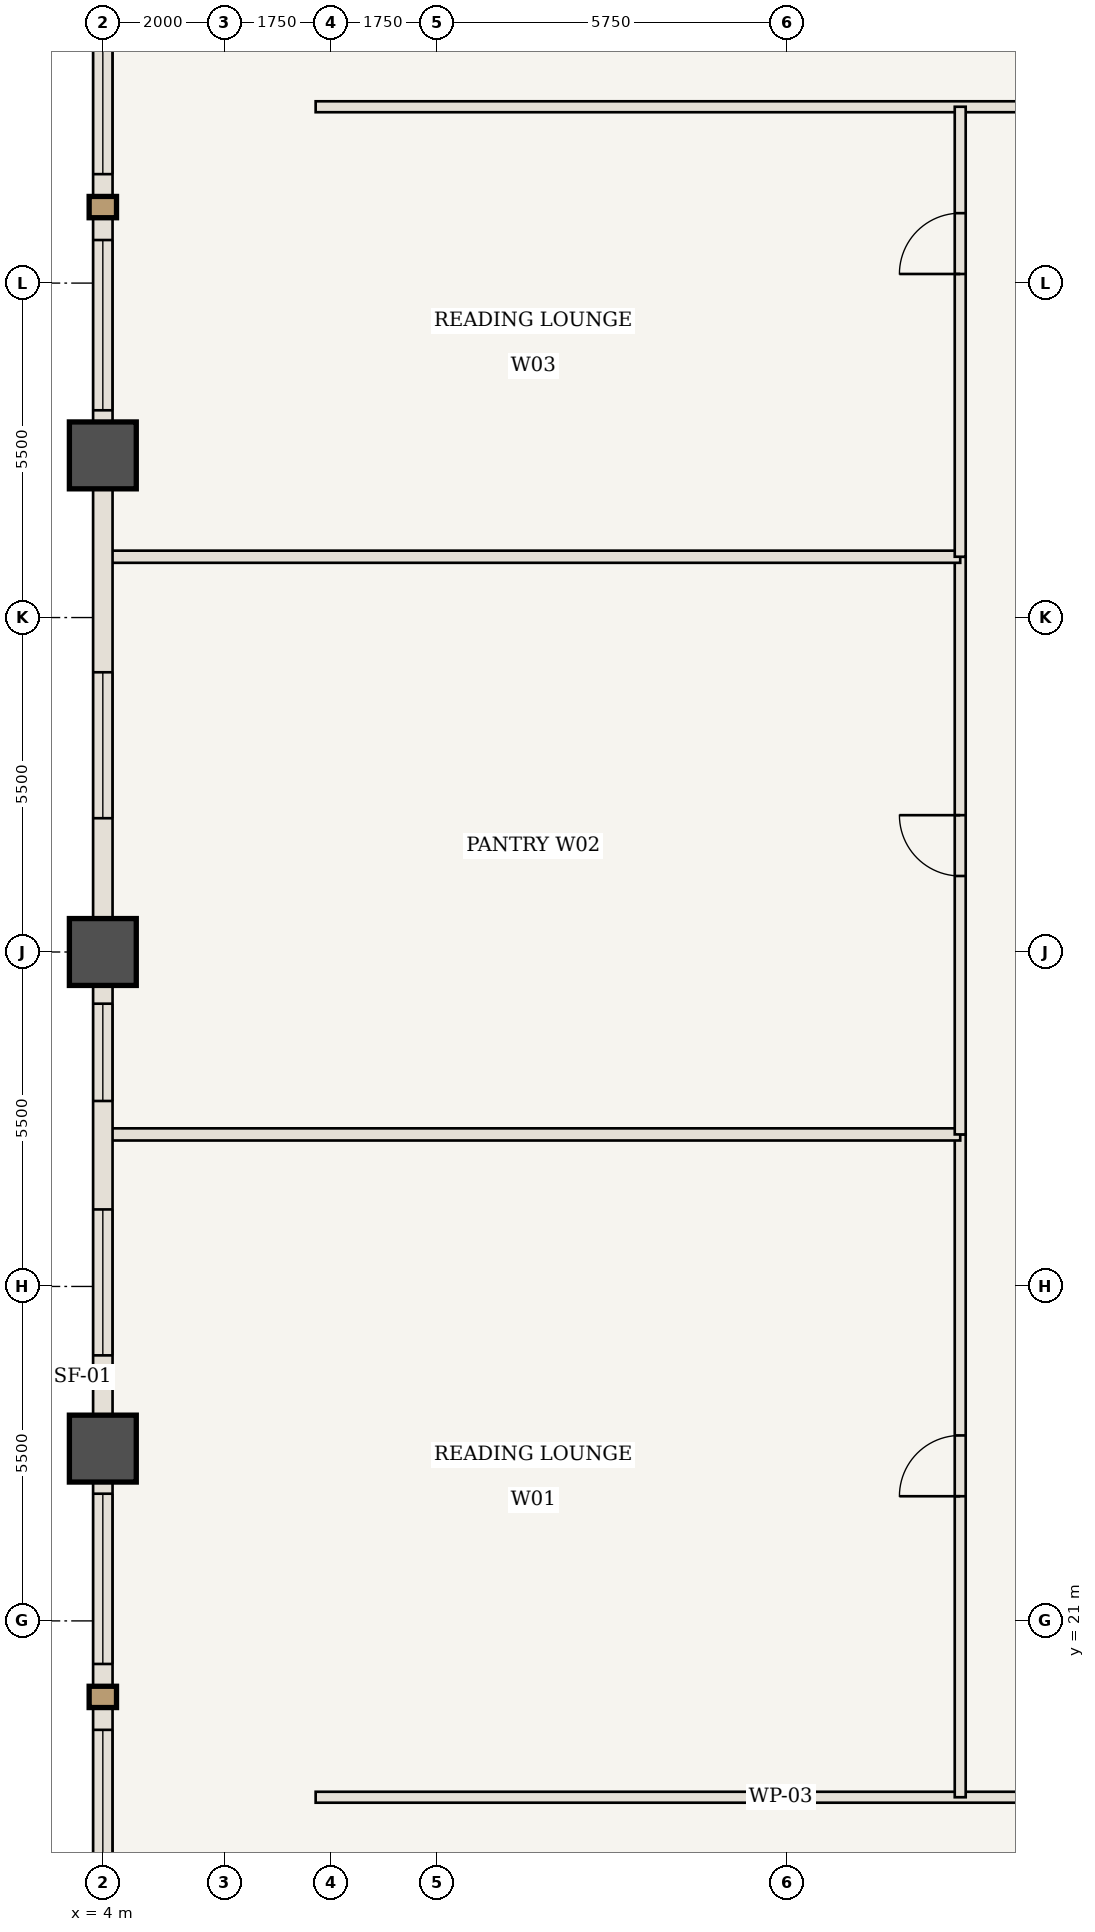
"""IFC4 building model, lengths in metres.
Left out: names, types, materials, properties, quantities, classifications, styles, units other than length and angle.
Written with IfcOpenShell. Run it as: python <this file> out.ifc"""

import sys

from ifc_helpers import new_model, si_unit, direction, frame, frame_2d, origin, origin_2d, place, context, subcontext, project, spatial, rectangle, extrude, element, fill, save


model = new_model("IFC4")
c1 = context("Model", 3, precision=1e-05, world=origin(), true_north=direction((0.0, 1.0)))
c2 = subcontext(c1, "Body", "Model", "MODEL_VIEW")
j1 = project(units=[si_unit("LENGTHUNIT", "METRE"), si_unit("PLANEANGLEUNIT", "RADIAN")], contexts=[c1])
p1 = place(None, origin())
s1 = spatial("IfcSite", under=j1, at=p1, CompositionType="ELEMENT")
p2 = place(p1, origin())
s2 = spatial("IfcBuilding", under=s1, at=p2, CompositionType="ELEMENT")
p3 = place(p2, frame((0.0, 0.0, 56.35)))
s3 = spatial("IfcBuildingStorey", under=s2, at=p3, CompositionType="ELEMENT", Elevation=56.35)
for number, where, z_axis, x_axis in (
    (1, (4.0, 23.833, 0.0), (0.0, 0.0, 1.0), (1.0, 0.0, 0.0)),
    (2, (4.0, 32.0, 0.0), (0.0, 0.0, 1.0), (1.0, 0.0, 0.0)),
    (3, (4.0, 40.167, 0.0), (0.0, 0.0, 1.0), (1.0, 0.0, 0.0)),
):
    element("IfcColumn", number, at=place(p3, frame(where, z_axis=z_axis, x_axis=x_axis)), inside=s3, PredefinedType="COLUMN", context=c2, shape_type="SweptSolid", body=[
        extrude(rectangle(XDim=1.1, YDim=1.1, at=origin_2d()), origin(), (0.0, 0.0, 1.0), 3.5),
    ])
p4 = place(p3, frame((7.5, 18.1, 0.0), z_axis=(0.0, 0.0, 1.0), x_axis=(1.0, 0.0, 0.0)))
e4 = element("IfcWall", 4, at=p4, inside=s3, PredefinedType="STANDARD", context=c2, shape_type="SweptSolid", body=[
    extrude(rectangle(XDim=15.3, YDim=0.18, at=frame_2d((7.65, 0.0))), origin(), (0.0, 0.0, 1.0), 3.32),
])
p5 = place(p4, frame((12.475, 0.0, 0.0)))
e5 = element("IfcOpeningElement", 5, at=p5, cuts=e4, PredefinedType="OPENING", context=c2, shape_type="SweptSolid", body=[
    extrude(rectangle(XDim=1.0, YDim=2.15, at=frame_2d((0.5, 1.075))), frame((0.0, 0.1, 0.0), z_axis=(0.0, -1.0, 0.0), x_axis=(1.0, 0.0, 0.0)), (0.0, 0.0, 1.0), 0.2),
])
p6 = place(p3, frame((7.5, 45.9, 0.0), z_axis=(0.0, 0.0, 1.0), x_axis=(1.0, 0.0, 0.0)))
e6 = element("IfcWall", 6, at=p6, inside=s3, PredefinedType="STANDARD", context=c2, shape_type="SweptSolid", body=[
    extrude(rectangle(XDim=16.4, YDim=0.18, at=frame_2d((8.2, 0.0))), origin(), (0.0, 0.0, 1.0), 3.32),
])
p7 = place(p6, frame((11.575, 0.0, 0.0)))
e7 = element("IfcOpeningElement", 7, at=p7, cuts=e6, PredefinedType="OPENING", context=c2, shape_type="SweptSolid", body=[
    extrude(rectangle(XDim=1.0, YDim=2.15, at=frame_2d((0.5, 1.075))), frame((0.0, 0.1, 0.0), z_axis=(0.0, -1.0, 0.0), x_axis=(1.0, 0.0, 0.0)), (0.0, 0.0, 1.0), 0.2),
])
p8 = place(p3, frame((18.1, 18.1, 0.0), z_axis=(0.0, 0.0, 1.0), x_axis=(0.0, 1.0, 0.0)))
e8 = element("IfcWall", 8, at=p8, inside=s3, PredefinedType="STANDARD", context=c2, shape_type="SweptSolid", body=[
    extrude(rectangle(XDim=10.9, YDim=0.18, at=frame_2d((5.45, 0.0))), origin(), (0.0, 0.0, 1.0), 3.32),
])
p9 = place(p8, frame((4.95, 0.0, 0.0)))
e9 = element("IfcOpeningElement", 9, at=p9, cuts=e8, PredefinedType="OPENING", context=c2, shape_type="SweptSolid", body=[
    extrude(rectangle(XDim=1.0, YDim=2.15, at=frame_2d((0.5, 1.075))), frame((0.0, 0.1, 0.0), z_axis=(0.0, -1.0, 0.0), x_axis=(1.0, 0.0, 0.0)), (0.0, 0.0, 1.0), 0.2),
])
p10 = place(p3, frame((4.06, 29.0, 0.0), z_axis=(0.0, 0.0, 1.0), x_axis=(1.0, 0.0, 0.0)))
e10 = element("IfcWall", 10, at=p10, inside=s3, PredefinedType="STANDARD", context=c2, shape_type="SweptSolid", body=[
    extrude(rectangle(XDim=14.04, YDim=0.2, at=frame_2d((7.02, 0.0))), origin(), (0.0, 0.0, 1.0), 3.32),
])
p11 = place(p3, frame((18.1, 29.0, 0.0), z_axis=(0.0, 0.0, 1.0), x_axis=(0.0, 1.0, 0.0)))
e11 = element("IfcWall", 11, at=p11, inside=s3, PredefinedType="STANDARD", context=c2, shape_type="SweptSolid", body=[
    extrude(rectangle(XDim=9.5, YDim=0.18, at=frame_2d((4.75, 0.0))), origin(), (0.0, 0.0, 1.0), 3.32),
])
p12 = place(p11, frame((4.25, 0.0, 0.0)))
e12 = element("IfcOpeningElement", 12, at=p12, cuts=e11, PredefinedType="OPENING", context=c2, shape_type="SweptSolid", body=[
    extrude(rectangle(XDim=1.0, YDim=2.15, at=frame_2d((0.5, 1.075))), frame((0.0, 0.1, 0.0), z_axis=(0.0, -1.0, 0.0), x_axis=(1.0, 0.0, 0.0)), (0.0, 0.0, 1.0), 0.2),
])
p13 = place(p3, frame((4.06, 38.5, 0.0), z_axis=(0.0, 0.0, 1.0), x_axis=(1.0, 0.0, 0.0)))
e13 = element("IfcWall", 13, at=p13, inside=s3, PredefinedType="STANDARD", context=c2, shape_type="SweptSolid", body=[
    extrude(rectangle(XDim=14.04, YDim=0.2, at=frame_2d((7.02, 0.0))), origin(), (0.0, 0.0, 1.0), 3.32),
])
p14 = place(p3, frame((18.1, 38.5, 0.0), z_axis=(0.0, 0.0, 1.0), x_axis=(0.0, 1.0, 0.0)))
e14 = element("IfcWall", 14, at=p14, inside=s3, PredefinedType="STANDARD", context=c2, shape_type="SweptSolid", body=[
    extrude(rectangle(XDim=7.4, YDim=0.18, at=frame_2d((3.7, 0.0))), origin(), (0.0, 0.0, 1.0), 3.32),
])
p15 = place(p14, frame((4.65, 0.0, 0.0)))
e15 = element("IfcOpeningElement", 15, at=p15, cuts=e14, PredefinedType="OPENING", context=c2, shape_type="SweptSolid", body=[
    extrude(rectangle(XDim=1.0, YDim=2.15, at=frame_2d((0.5, 1.075))), frame((0.0, 0.1, 0.0), z_axis=(0.0, -1.0, 0.0), x_axis=(1.0, 0.0, 0.0)), (0.0, 0.0, 1.0), 0.2),
])
p16 = place(p3, frame((4.0, 15.667, 0.0), z_axis=(0.0, 0.0, 1.0), x_axis=(0.0, 1.0, 0.0)))
e16 = element("IfcWall", 16, at=p16, inside=s3, PredefinedType="USERDEFINED", context=c2, shape_type="SweptSolid", body=[
    extrude(rectangle(XDim=8.167, YDim=0.32, at=frame_2d((4.083, 0.0))), origin(), (0.0, 0.0, 1.0), 2.52),
])
p17 = place(p16, frame((0.742, 0.0, 0.85)))
e17 = element("IfcOpeningElement", 17, at=p17, cuts=e16, PredefinedType="OPENING", context=c2, shape_type="SweptSolid", body=[
    extrude(rectangle(XDim=2.8, YDim=1.47, at=frame_2d((1.4, 0.735))), frame((0.0, 0.17, 0.0), z_axis=(0.0, -1.0, 0.0), x_axis=(1.0, 0.0, 0.0)), (0.0, 0.0, 1.0), 0.34),
])
p18 = place(p16, frame((4.625, 0.0, 0.85)))
e18 = element("IfcOpeningElement", 18, at=p18, cuts=e16, PredefinedType="OPENING", context=c2, shape_type="SweptSolid", body=[
    extrude(rectangle(XDim=2.8, YDim=1.47, at=frame_2d((1.4, 0.735))), frame((0.0, 0.17, 0.0), z_axis=(0.0, -1.0, 0.0), x_axis=(1.0, 0.0, 0.0)), (0.0, 0.0, 1.0), 0.34),
])
p19 = place(p3, frame((4.0, 23.833, 0.0), z_axis=(0.0, 0.0, 1.0), x_axis=(0.0, 1.0, 0.0)))
e19 = element("IfcWall", 19, at=p19, inside=s3, PredefinedType="USERDEFINED", context=c2, shape_type="SweptSolid", body=[
    extrude(rectangle(XDim=8.167, YDim=0.32, at=frame_2d((4.083, 0.0))), origin(), (0.0, 0.0, 1.0), 2.52),
])
p20 = place(p19, frame((1.533, 0.0, 0.85)))
e20 = element("IfcOpeningElement", 20, at=p20, cuts=e19, PredefinedType="OPENING", context=c2, shape_type="SweptSolid", body=[
    extrude(rectangle(XDim=2.4, YDim=1.47, at=frame_2d((1.2, 0.735))), frame((0.0, 0.17, 0.0), z_axis=(0.0, -1.0, 0.0), x_axis=(1.0, 0.0, 0.0)), (0.0, 0.0, 1.0), 0.34),
])
p21 = place(p19, frame((5.717, 0.0, 0.85)))
e21 = element("IfcOpeningElement", 21, at=p21, cuts=e19, PredefinedType="OPENING", context=c2, shape_type="SweptSolid", body=[
    extrude(rectangle(XDim=1.6, YDim=1.47, at=frame_2d((0.8, 0.735))), frame((0.0, 0.17, 0.0), z_axis=(0.0, -1.0, 0.0), x_axis=(1.0, 0.0, 0.0)), (0.0, 0.0, 1.0), 0.34),
])
p22 = place(p3, frame((4.0, 32.0, 0.0), z_axis=(0.0, 0.0, 1.0), x_axis=(0.0, 1.0, 0.0)))
e22 = element("IfcWall", 22, at=p22, inside=s3, PredefinedType="USERDEFINED", context=c2, shape_type="SweptSolid", body=[
    extrude(rectangle(XDim=8.167, YDim=0.32, at=frame_2d((4.083, 0.0))), origin(), (0.0, 0.0, 1.0), 2.52),
])
p23 = place(p22, frame((2.2, 0.0, 0.85)))
e23 = element("IfcOpeningElement", 23, at=p23, cuts=e22, PredefinedType="OPENING", context=c2, shape_type="SweptSolid", body=[
    extrude(rectangle(XDim=2.4, YDim=1.47, at=frame_2d((1.2, 0.735))), frame((0.0, 0.17, 0.0), z_axis=(0.0, -1.0, 0.0), x_axis=(1.0, 0.0, 0.0)), (0.0, 0.0, 1.0), 0.34),
])
p24 = place(p3, frame((4.0, 40.167, 0.0), z_axis=(0.0, 0.0, 1.0), x_axis=(0.0, 1.0, 0.0)))
e24 = element("IfcWall", 24, at=p24, inside=s3, PredefinedType="USERDEFINED", context=c2, shape_type="SweptSolid", body=[
    extrude(rectangle(XDim=8.167, YDim=0.32, at=frame_2d((4.083, 0.0))), origin(), (0.0, 0.0, 1.0), 2.52),
])
p25 = place(p24, frame((0.742, 0.0, 0.85)))
e25 = element("IfcOpeningElement", 25, at=p25, cuts=e24, PredefinedType="OPENING", context=c2, shape_type="SweptSolid", body=[
    extrude(rectangle(XDim=2.8, YDim=1.47, at=frame_2d((1.4, 0.735))), frame((0.0, 0.17, 0.0), z_axis=(0.0, -1.0, 0.0), x_axis=(1.0, 0.0, 0.0)), (0.0, 0.0, 1.0), 0.34),
])
p26 = place(p24, frame((4.625, 0.0, 0.85)))
e26 = element("IfcOpeningElement", 26, at=p26, cuts=e24, PredefinedType="OPENING", context=c2, shape_type="SweptSolid", body=[
    extrude(rectangle(XDim=2.8, YDim=1.47, at=frame_2d((1.4, 0.735))), frame((0.0, 0.17, 0.0), z_axis=(0.0, -1.0, 0.0), x_axis=(1.0, 0.0, 0.0)), (0.0, 0.0, 1.0), 0.34),
])
p27 = place(p9, origin())
e27 = element("IfcDoor", 27, at=p27, inside=s3, OperationType="SINGLE_SWING_LEFT", PredefinedType="DOOR", context=c2, shape_type="SweptSolid", body=[
    extrude(rectangle(XDim=1.0, YDim=2.15, at=frame_2d((0.5, 1.075))), frame((0.0, 0.025, 0.0), z_axis=(0.0, -1.0, 0.0), x_axis=(1.0, 0.0, 0.0)), (0.0, 0.0, 1.0), 0.05),
])
fill(e9, e27)
p28 = place(p12, origin())
e28 = element("IfcDoor", 28, at=p28, inside=s3, OperationType="SINGLE_SWING_RIGHT", PredefinedType="DOOR", context=c2, shape_type="SweptSolid", body=[
    extrude(rectangle(XDim=1.0, YDim=2.15, at=frame_2d((0.5, 1.075))), frame((0.0, 0.025, 0.0), z_axis=(0.0, -1.0, 0.0), x_axis=(1.0, 0.0, 0.0)), (0.0, 0.0, 1.0), 0.05),
])
fill(e12, e28)
p29 = place(p15, origin())
e29 = element("IfcDoor", 29, at=p29, inside=s3, OperationType="SINGLE_SWING_LEFT", PredefinedType="DOOR", context=c2, shape_type="SweptSolid", body=[
    extrude(rectangle(XDim=1.0, YDim=2.15, at=frame_2d((0.5, 1.075))), frame((0.0, 0.025, 0.0), z_axis=(0.0, -1.0, 0.0), x_axis=(1.0, 0.0, 0.0)), (0.0, 0.0, 1.0), 0.05),
])
fill(e15, e29)
p30 = place(p17, origin())
e30 = element("IfcWindow", 30, at=p30, inside=s3, PartitioningType="SINGLE_PANEL", PredefinedType="WINDOW", context=c2, shape_type="SweptSolid", body=[
    extrude(rectangle(XDim=2.8, YDim=1.47, at=frame_2d((1.4, 0.735))), frame((0.0, 0.03, 0.0), z_axis=(0.0, -1.0, 0.0), x_axis=(1.0, 0.0, 0.0)), (0.0, 0.0, 1.0), 0.06),
])
fill(e17, e30)
p31 = place(p18, origin())
e31 = element("IfcWindow", 31, at=p31, inside=s3, PartitioningType="SINGLE_PANEL", PredefinedType="WINDOW", context=c2, shape_type="SweptSolid", body=[
    extrude(rectangle(XDim=2.8, YDim=1.47, at=frame_2d((1.4, 0.735))), frame((0.0, 0.03, 0.0), z_axis=(0.0, -1.0, 0.0), x_axis=(1.0, 0.0, 0.0)), (0.0, 0.0, 1.0), 0.06),
])
fill(e18, e31)
p32 = place(p20, origin())
e32 = element("IfcWindow", 32, at=p32, inside=s3, PartitioningType="SINGLE_PANEL", PredefinedType="WINDOW", context=c2, shape_type="SweptSolid", body=[
    extrude(rectangle(XDim=2.4, YDim=1.47, at=frame_2d((1.2, 0.735))), frame((0.0, 0.03, 0.0), z_axis=(0.0, -1.0, 0.0), x_axis=(1.0, 0.0, 0.0)), (0.0, 0.0, 1.0), 0.06),
])
fill(e20, e32)
p33 = place(p21, origin())
e33 = element("IfcWindow", 33, at=p33, inside=s3, PartitioningType="SINGLE_PANEL", PredefinedType="WINDOW", context=c2, shape_type="SweptSolid", body=[
    extrude(rectangle(XDim=1.6, YDim=1.47, at=frame_2d((0.8, 0.735))), frame((0.0, 0.03, 0.0), z_axis=(0.0, -1.0, 0.0), x_axis=(1.0, 0.0, 0.0)), (0.0, 0.0, 1.0), 0.06),
])
fill(e21, e33)
p34 = place(p23, origin())
e34 = element("IfcWindow", 34, at=p34, inside=s3, PartitioningType="SINGLE_PANEL", PredefinedType="WINDOW", context=c2, shape_type="SweptSolid", body=[
    extrude(rectangle(XDim=2.4, YDim=1.47, at=frame_2d((1.2, 0.735))), frame((0.0, 0.03, 0.0), z_axis=(0.0, -1.0, 0.0), x_axis=(1.0, 0.0, 0.0)), (0.0, 0.0, 1.0), 0.06),
])
fill(e23, e34)
p35 = place(p25, origin())
e35 = element("IfcWindow", 35, at=p35, inside=s3, PartitioningType="SINGLE_PANEL", PredefinedType="WINDOW", context=c2, shape_type="SweptSolid", body=[
    extrude(rectangle(XDim=2.8, YDim=1.47, at=frame_2d((1.4, 0.735))), frame((0.0, 0.03, 0.0), z_axis=(0.0, -1.0, 0.0), x_axis=(1.0, 0.0, 0.0)), (0.0, 0.0, 1.0), 0.06),
])
fill(e25, e35)
p36 = place(p26, origin())
e36 = element("IfcWindow", 36, at=p36, inside=s3, PartitioningType="SINGLE_PANEL", PredefinedType="WINDOW", context=c2, shape_type="SweptSolid", body=[
    extrude(rectangle(XDim=2.8, YDim=1.47, at=frame_2d((1.4, 0.735))), frame((0.0, 0.03, 0.0), z_axis=(0.0, -1.0, 0.0), x_axis=(1.0, 0.0, 0.0)), (0.0, 0.0, 1.0), 0.06),
])
fill(e26, e36)
save(model, sys.argv[1])
